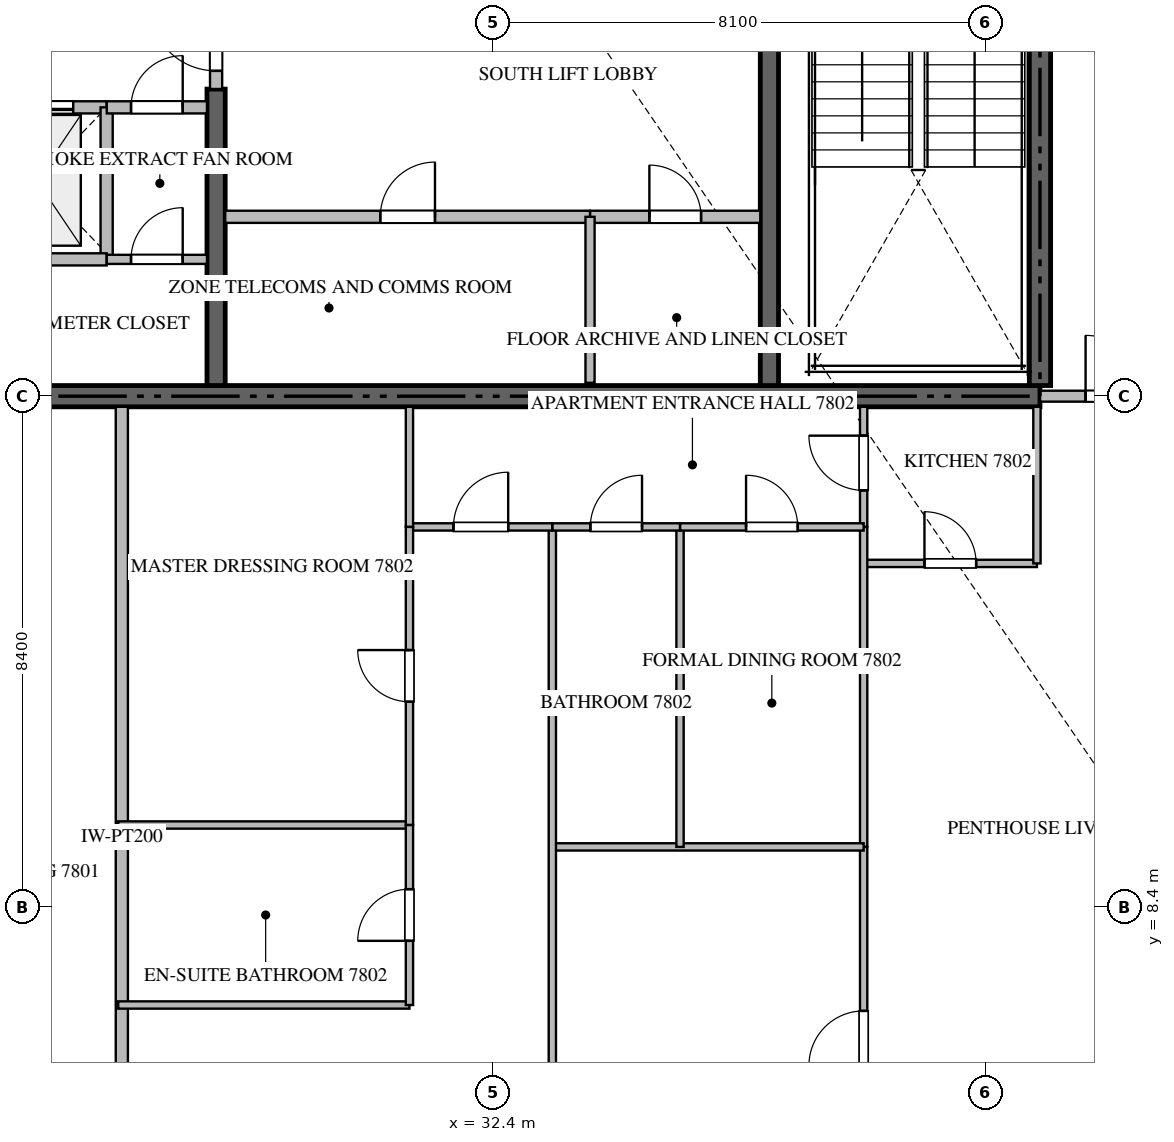
"""IFC4 building model, lengths in metres.
Left out: names, types, materials, properties, quantities, classifications, styles, units other than length and angle.
Written with IfcOpenShell. Run it as: python <this file> out.ifc"""

import sys

from ifc_helpers import new_model, si_unit, direction, frame, frame_2d, origin, place, context, subcontext, project, spatial, rectangle, extrude, source, transform, mapped, element, fill, save


model = new_model("IFC4")
c1 = context("Model", 3, precision=1e-05, world=origin(), true_north=direction((0.0, 1.0)))
c2 = subcontext(c1, "Body", "Model", "MODEL_VIEW")
j1 = project(units=[si_unit("LENGTHUNIT", "METRE"), si_unit("PLANEANGLEUNIT", "RADIAN")], contexts=[c1])
p1 = place(None, origin())
s1 = spatial("IfcSite", under=j1, at=p1, CompositionType="ELEMENT")
p2 = place(p1, origin())
s2 = spatial("IfcBuilding", under=s1, at=p2, CompositionType="ELEMENT")
p3 = place(p2, frame((0.0, 0.0, 313.7)))
s3 = spatial("IfcBuildingStorey", under=s2, at=p3, CompositionType="ELEMENT", Elevation=313.7)
p4 = place(p3, frame((23.4, 16.8, -0.26), z_axis=(0.0, 0.0, 1.0), x_axis=(1.0, 0.0, 0.0)))
e1 = element("IfcWall", 1, at=p4, inside=s3, PredefinedType="SHEAR", context=c2, shape_type="SweptSolid", body=[
    extrude(rectangle(XDim=18.0, YDim=0.35, at=frame_2d((9.0, 0.0))), origin(), (0.0, 0.0, 1.0), 4.048),
])
p5 = place(p3, frame((41.4, 16.975, -0.26), z_axis=(0.0, 0.0, 1.0), x_axis=(0.0, 1.0, 0.0)))
e2 = element("IfcWall", 2, at=p5, inside=s3, PredefinedType="SHEAR", context=c2, shape_type="SweptSolid", body=[
    extrude(rectangle(XDim=8.375, YDim=0.35, at=frame_2d((4.188, 0.0))), origin(), (0.0, 0.0, 1.0), 4.048),
])
p6 = place(p3, frame((27.85, 16.975, -0.26), z_axis=(0.0, 0.0, 1.0), x_axis=(0.0, 1.0, 0.0)))
e3 = element("IfcWall", 3, at=p6, inside=s3, PredefinedType="SHEAR", context=c2, shape_type="SweptSolid", body=[
    extrude(rectangle(XDim=4.875, YDim=0.3, at=frame_2d((2.438, 0.0))), origin(), (0.0, 0.0, 1.0), 4.048),
])
p7 = place(p3, frame((36.95, 16.975, -0.26), z_axis=(0.0, 0.0, 1.0), x_axis=(0.0, 1.0, 0.0)))
e4 = element("IfcWall", 4, at=p7, inside=s3, PredefinedType="SHEAR", context=c2, shape_type="SweptSolid", body=[
    extrude(rectangle(XDim=8.375, YDim=0.3, at=frame_2d((4.188, 0.0))), origin(), (0.0, 0.0, 1.0), 4.048),
])
p8 = place(p3, frame((23.575, 21.55, 0.0), z_axis=(0.0, 0.0, 1.0), x_axis=(1.0, 0.0, 0.0)))
e5 = element("IfcWall", 5, at=p8, inside=s3, PredefinedType="STANDARD", context=c2, shape_type="SweptSolid", body=[
    extrude(rectangle(XDim=2.475, YDim=0.2, at=frame_2d((1.238, 0.0))), origin(), (0.0, 0.0, 1.0), 3.79),
])
p9 = place(p8, frame((0.725, 0.0, 0.0)))
e6 = element("IfcOpeningElement", 6, at=p9, cuts=e5, PredefinedType="OPENING", context=c2, shape_type="SweptSolid", body=[
    extrude(rectangle(XDim=1.2, YDim=2.2, at=frame_2d((0.6, 1.1))), frame((0.0, 0.11, 0.0), z_axis=(0.0, -1.0, 0.0), x_axis=(1.0, 0.0, 0.0)), (0.0, 0.0, 1.0), 0.22),
])
p10 = place(p3, frame((26.05, 19.05, 0.0), z_axis=(0.0, 0.0, 1.0), x_axis=(0.0, 1.0, 0.0)))
e7 = element("IfcWall", 7, at=p10, inside=s3, PredefinedType="STANDARD", context=c2, shape_type="SweptSolid", body=[
    extrude(rectangle(XDim=2.5, YDim=0.2, at=frame_2d((1.25, 0.0))), origin(), (0.0, 0.0, 1.0), 3.79),
])
p11 = place(p3, frame((23.575, 19.05, 0.0), z_axis=(0.0, 0.0, 1.0), x_axis=(1.0, 0.0, 0.0)))
e8 = element("IfcWall", 8, at=p11, inside=s3, PredefinedType="STANDARD", context=c2, shape_type="SweptSolid", body=[
    extrude(rectangle(XDim=2.475, YDim=0.2, at=frame_2d((1.238, 0.0))), origin(), (0.0, 0.0, 1.0), 3.79),
])
p12 = place(p3, frame((26.052, 21.55, 0.0), z_axis=(0.0, 0.0, 1.0), x_axis=(1.0, 0.0, 0.0)))
e9 = element("IfcWall", 9, at=p12, inside=s3, PredefinedType="STANDARD", context=c2, shape_type="SweptSolid", body=[
    extrude(rectangle(XDim=1.648, YDim=0.2, at=frame_2d((0.824, 0.0))), origin(), (0.0, 0.0, 1.0), 3.79),
])
p13 = place(p12, frame((0.399, 0.0, 0.0)))
e10 = element("IfcOpeningElement", 10, at=p13, cuts=e9, PredefinedType="OPENING", context=c2, shape_type="SweptSolid", body=[
    extrude(rectangle(XDim=0.85, YDim=2.1, at=frame_2d((0.425, 1.05))), frame((0.0, 0.11, 0.0), z_axis=(0.0, -1.0, 0.0), x_axis=(1.0, 0.0, 0.0)), (0.0, 0.0, 1.0), 0.22),
])
p14 = place(p3, frame((27.85, 21.852, 0.0), z_axis=(0.0, 0.0, 1.0), x_axis=(0.0, 1.0, 0.0)))
e11 = element("IfcWall", 11, at=p14, inside=s3, PredefinedType="STANDARD", context=c2, shape_type="SweptSolid", body=[
    extrude(rectangle(XDim=1.696, YDim=0.2, at=frame_2d((0.848, 0.0))), origin(), (0.0, 0.0, 1.0), 3.79),
])
p15 = place(p14, frame((0.298, 0.0, 0.0)))
e12 = element("IfcOpeningElement", 12, at=p15, cuts=e11, PredefinedType="OPENING", context=c2, shape_type="SweptSolid", body=[
    extrude(rectangle(XDim=1.1, YDim=2.15, at=frame_2d((0.55, 1.075))), frame((0.0, 0.11, 0.0), z_axis=(0.0, -1.0, 0.0), x_axis=(1.0, 0.0, 0.0)), (0.0, 0.0, 1.0), 0.22),
])
p16 = place(p3, frame((26.052, 19.05, 0.0), z_axis=(0.0, 0.0, 1.0), x_axis=(1.0, 0.0, 0.0)))
e13 = element("IfcWall", 13, at=p16, inside=s3, PredefinedType="PARTITIONING", context=c2, shape_type="SweptSolid", body=[
    extrude(rectangle(XDim=1.648, YDim=0.15, at=frame_2d((0.824, 0.0))), origin(), (0.0, 0.0, 1.0), 3.79),
])
p17 = place(p16, frame((0.399, 0.0, 0.0)))
e14 = element("IfcOpeningElement", 14, at=p17, cuts=e13, PredefinedType="OPENING", context=c2, shape_type="SweptSolid", body=[
    extrude(rectangle(XDim=0.85, YDim=2.1, at=frame_2d((0.425, 1.05))), frame((0.0, 0.085, 0.0), z_axis=(0.0, -1.0, 0.0), x_axis=(1.0, 0.0, 0.0)), (0.0, 0.0, 1.0), 0.17),
])
p18 = place(p3, frame((28.0, 19.75, 0.0), z_axis=(0.0, 0.0, 1.0), x_axis=(1.0, 0.0, 0.0)))
e15 = element("IfcWall", 15, at=p18, inside=s3, PredefinedType="STANDARD", context=c2, shape_type="SweptSolid", body=[
    extrude(rectangle(XDim=6.0, YDim=0.2, at=frame_2d((3.0, 0.0))), origin(), (0.0, 0.0, 1.0), 3.79),
])
p19 = place(p18, frame((2.55, 0.0, 0.0)))
e16 = element("IfcOpeningElement", 16, at=p19, cuts=e15, PredefinedType="OPENING", context=c2, shape_type="SweptSolid", body=[
    extrude(rectangle(XDim=0.9, YDim=2.1, at=frame_2d((0.45, 1.05))), frame((0.0, 0.11, 0.0), z_axis=(0.0, -1.0, 0.0), x_axis=(1.0, 0.0, 0.0)), (0.0, 0.0, 1.0), 0.22),
])
p20 = place(p3, frame((34.002, 19.75, 0.0), z_axis=(0.0, 0.0, 1.0), x_axis=(1.0, 0.0, 0.0)))
e17 = element("IfcWall", 17, at=p20, inside=s3, PredefinedType="STANDARD", context=c2, shape_type="SweptSolid", body=[
    extrude(rectangle(XDim=2.798, YDim=0.2, at=frame_2d((1.399, 0.0))), origin(), (0.0, 0.0, 1.0), 3.79),
])
p21 = place(p20, frame((0.974, 0.0, 0.0)))
e18 = element("IfcOpeningElement", 18, at=p21, cuts=e17, PredefinedType="OPENING", context=c2, shape_type="SweptSolid", body=[
    extrude(rectangle(XDim=0.85, YDim=2.1, at=frame_2d((0.425, 1.05))), frame((0.0, 0.11, 0.0), z_axis=(0.0, -1.0, 0.0), x_axis=(1.0, 0.0, 0.0)), (0.0, 0.0, 1.0), 0.22),
])
p22 = place(p3, frame((34.0, 17.02, 0.0), z_axis=(0.0, 0.0, 1.0), x_axis=(0.0, 1.0, 0.0)))
e19 = element("IfcWall", 19, at=p22, inside=s3, PredefinedType="PARTITIONING", context=c2, shape_type="SweptSolid", body=[
    extrude(rectangle(XDim=2.73, YDim=0.15, at=frame_2d((1.365, 0.0))), origin(), (0.0, 0.0, 1.0), 3.79),
])
p23 = place(p3, frame((26.3, 2.482, 0.0), z_axis=(0.0, 0.0, 1.0), x_axis=(0.0, 1.0, 0.0)))
e20 = element("IfcWall", 20, at=p23, inside=s3, PredefinedType="PARTITIONING", context=c2, shape_type="SweptSolid", body=[
    extrude(rectangle(XDim=14.143, YDim=0.2, at=frame_2d((7.072, 0.0))), origin(), (0.0, 0.0, 1.0), 3.79),
])
p24 = place(p3, frame((41.402, 16.8, 0.0), z_axis=(0.0, 0.0, 1.0), x_axis=(1.0, 0.0, 0.0)))
e21 = element("IfcWall", 21, at=p24, inside=s3, PredefinedType="PARTITIONING", context=c2, shape_type="SweptSolid", body=[
    extrude(rectangle(XDim=2.496, YDim=0.18, at=frame_2d((1.248, 0.0))), origin(), (0.0, 0.0, 1.0), 3.79),
])
p25 = place(p24, frame((0.748, 0.0, 0.0)))
e22 = element("IfcOpeningElement", 22, at=p25, cuts=e21, PredefinedType="OPENING", context=c2, shape_type="SweptSolid", body=[
    extrude(rectangle(XDim=1.0, YDim=2.15, at=frame_2d((0.5, 1.075))), frame((0.0, 0.1, 0.0), z_axis=(0.0, -1.0, 0.0), x_axis=(1.0, 0.0, 0.0)), (0.0, 0.0, 1.0), 0.2),
])
p26 = place(p3, frame((38.5, 14.05, 0.0), z_axis=(0.0, 0.0, 1.0), x_axis=(1.0, 0.0, 0.0)))
e23 = element("IfcWall", 23, at=p26, inside=s3, PredefinedType="PARTITIONING", context=c2, shape_type="SweptSolid", body=[
    extrude(rectangle(XDim=2.85, YDim=0.12, at=frame_2d((1.425, 0.0))), origin(), (0.0, 0.0, 1.0), 3.79),
])
p27 = place(p26, frame((1.0, 0.0, 0.0)))
e24 = element("IfcOpeningElement", 24, at=p27, cuts=e23, PredefinedType="OPENING", context=c2, shape_type="SweptSolid", body=[
    extrude(rectangle(XDim=0.85, YDim=2.1, at=frame_2d((0.425, 1.05))), frame((0.0, 0.07, 0.0), z_axis=(0.0, -1.0, 0.0), x_axis=(1.0, 0.0, 0.0)), (0.0, 0.0, 1.0), 0.14),
])
p28 = place(p3, frame((41.35, 14.05, 0.0), z_axis=(0.0, 0.0, 1.0), x_axis=(0.0, 1.0, 0.0)))
e25 = element("IfcWall", 25, at=p28, inside=s3, PredefinedType="PARTITIONING", context=c2, shape_type="SweptSolid", body=[
    extrude(rectangle(XDim=2.575, YDim=0.12, at=frame_2d((1.288, 0.0))), origin(), (0.0, 0.0, 1.0), 3.79),
])
p29 = place(p3, frame((38.5, 14.65, 0.0), z_axis=(0.0, 0.0, 1.0), x_axis=(0.0, 1.0, 0.0)))
e26 = element("IfcWall", 26, at=p29, inside=s3, PredefinedType="PARTITIONING", context=c2, shape_type="SweptSolid", body=[
    extrude(rectangle(XDim=1.975, YDim=0.12, at=frame_2d((0.988, 0.0))), origin(), (0.0, 0.0, 1.0), 3.79),
])
p30 = place(p29, frame((0.601, 0.0, 0.0)))
e27 = element("IfcOpeningElement", 27, at=p30, cuts=e26, PredefinedType="OPENING", context=c2, shape_type="SweptSolid", body=[
    extrude(rectangle(XDim=0.9, YDim=2.1, at=frame_2d((0.45, 1.05))), frame((0.0, 0.07, 0.0), z_axis=(0.0, -1.0, 0.0), x_axis=(1.0, 0.0, 0.0)), (0.0, 0.0, 1.0), 0.14),
])
p31 = place(p3, frame((38.5, 2.495, 0.0), z_axis=(0.0, 0.0, 1.0), x_axis=(0.0, 1.0, 0.0)))
e28 = element("IfcWall", 28, at=p31, inside=s3, PredefinedType="PARTITIONING", context=c2, shape_type="SweptSolid", body=[
    extrude(rectangle(XDim=6.893, YDim=0.12, at=frame_2d((3.446, 0.0))), origin(), (0.0, 0.0, 1.0), 3.79),
])
p32 = place(p31, frame((3.296, 0.0, 0.0)))
e29 = element("IfcOpeningElement", 29, at=p32, cuts=e28, PredefinedType="OPENING", context=c2, shape_type="SweptSolid", body=[
    extrude(rectangle(XDim=0.9, YDim=2.1, at=frame_2d((0.45, 1.05))), frame((0.0, 0.07, 0.0), z_axis=(0.0, -1.0, 0.0), x_axis=(1.0, 0.0, 0.0)), (0.0, 0.0, 1.0), 0.14),
])
p33 = place(p3, frame((38.5, 9.39, 0.0), z_axis=(0.0, 0.0, 1.0), x_axis=(0.0, 1.0, 0.0)))
e30 = element("IfcWall", 30, at=p33, inside=s3, PredefinedType="PARTITIONING", context=c2, shape_type="SweptSolid", body=[
    extrude(rectangle(XDim=5.258, YDim=0.12, at=frame_2d((2.629, 0.0))), origin(), (0.0, 0.0, 1.0), 3.79),
])
p34 = place(p3, frame((33.38, 9.388, 0.0), z_axis=(0.0, 0.0, 1.0), x_axis=(1.0, 0.0, 0.0)))
e31 = element("IfcWall", 31, at=p34, inside=s3, PredefinedType="PARTITIONING", context=c2, shape_type="SweptSolid", body=[
    extrude(rectangle(XDim=5.12, YDim=0.12, at=frame_2d((2.56, 0.0))), origin(), (0.0, 0.0, 1.0), 3.79),
])
p35 = place(p3, frame((33.38, 2.495, 0.0), z_axis=(0.0, 0.0, 1.0), x_axis=(0.0, 1.0, 0.0)))
e32 = element("IfcWall", 32, at=p35, inside=s3, PredefinedType="PARTITIONING", context=c2, shape_type="SweptSolid", body=[
    extrude(rectangle(XDim=12.155, YDim=0.12, at=frame_2d((6.077, 0.0))), origin(), (0.0, 0.0, 1.0), 3.79),
])
p36 = place(p3, frame((35.48, 9.388, 0.0), z_axis=(0.0, 0.0, 1.0), x_axis=(0.0, 1.0, 0.0)))
e33 = element("IfcWall", 33, at=p36, inside=s3, PredefinedType="PARTITIONING", context=c2, shape_type="SweptSolid", body=[
    extrude(rectangle(XDim=5.262, YDim=0.12, at=frame_2d((2.631, 0.0))), origin(), (0.0, 0.0, 1.0), 3.79),
])
p37 = place(p3, frame((33.38, 14.65, 0.0), z_axis=(0.0, 0.0, 1.0), x_axis=(1.0, 0.0, 0.0)))
e34 = element("IfcWall", 34, at=p37, inside=s3, PredefinedType="PARTITIONING", context=c2, shape_type="SweptSolid", body=[
    extrude(rectangle(XDim=2.1, YDim=0.12, at=frame_2d((1.05, 0.0))), origin(), (0.0, 0.0, 1.0), 3.79),
])
p38 = place(p37, frame((0.625, 0.0, 0.0)))
e35 = element("IfcOpeningElement", 35, at=p38, cuts=e34, PredefinedType="OPENING", context=c2, shape_type="SweptSolid", body=[
    extrude(rectangle(XDim=0.85, YDim=2.1, at=frame_2d((0.425, 1.05))), frame((0.0, 0.07, 0.0), z_axis=(0.0, -1.0, 0.0), x_axis=(1.0, 0.0, 0.0)), (0.0, 0.0, 1.0), 0.14),
])
p39 = place(p3, frame((35.482, 14.65, 0.0), z_axis=(0.0, 0.0, 1.0), x_axis=(1.0, 0.0, 0.0)))
e36 = element("IfcWall", 36, at=p39, inside=s3, PredefinedType="PARTITIONING", context=c2, shape_type="SweptSolid", body=[
    extrude(rectangle(XDim=3.018, YDim=0.12, at=frame_2d((1.509, 0.0))), origin(), (0.0, 0.0, 1.0), 3.79),
])
p40 = place(p39, frame((1.084, 0.0, 0.0)))
e37 = element("IfcOpeningElement", 37, at=p40, cuts=e36, PredefinedType="OPENING", context=c2, shape_type="SweptSolid", body=[
    extrude(rectangle(XDim=0.85, YDim=2.1, at=frame_2d((0.425, 1.05))), frame((0.0, 0.07, 0.0), z_axis=(0.0, -1.0, 0.0), x_axis=(1.0, 0.0, 0.0)), (0.0, 0.0, 1.0), 0.14),
])
p41 = place(p3, frame((31.03, 14.65, 0.0), z_axis=(0.0, 0.0, 1.0), x_axis=(1.0, 0.0, 0.0)))
e38 = element("IfcWall", 38, at=p41, inside=s3, PredefinedType="PARTITIONING", context=c2, shape_type="SweptSolid", body=[
    extrude(rectangle(XDim=2.348, YDim=0.12, at=frame_2d((1.174, 0.0))), origin(), (0.0, 0.0, 1.0), 3.79),
])
p42 = place(p41, frame((0.724, 0.0, 0.0)))
e39 = element("IfcOpeningElement", 39, at=p42, cuts=e38, PredefinedType="OPENING", context=c2, shape_type="SweptSolid", body=[
    extrude(rectangle(XDim=0.9, YDim=2.1, at=frame_2d((0.45, 1.05))), frame((0.0, 0.07, 0.0), z_axis=(0.0, -1.0, 0.0), x_axis=(1.0, 0.0, 0.0)), (0.0, 0.0, 1.0), 0.14),
])
for number, where, z_axis, x_axis in (
    (40, (26.24, 6.788, 0.0), (0.0, 0.0, 1.0), (1.0, 0.0, 0.0)),
    (41, (26.24, 9.748, 0.0), (0.0, 0.0, 1.0), (1.0, 0.0, 0.0)),
):
    element("IfcWall", number, at=place(p3, frame(where, z_axis=z_axis, x_axis=x_axis)), inside=s3, PredefinedType="PARTITIONING", context=c2, shape_type="SweptSolid", body=[
        extrude(rectangle(XDim=4.79, YDim=0.12, at=frame_2d((2.395, 0.0))), origin(), (0.0, 0.0, 1.0), 3.79),
    ])
p43 = place(p3, frame((31.03, 6.788, 0.0), z_axis=(0.0, 0.0, 1.0), x_axis=(0.0, 1.0, 0.0)))
e42 = element("IfcWall", 42, at=p43, inside=s3, PredefinedType="PARTITIONING", context=c2, shape_type="SweptSolid", body=[
    extrude(rectangle(XDim=2.96, YDim=0.12, at=frame_2d((1.48, 0.0))), origin(), (0.0, 0.0, 1.0), 3.79),
])
p44 = place(p43, frame((1.055, 0.0, 0.0)))
e43 = element("IfcOpeningElement", 43, at=p44, cuts=e42, PredefinedType="OPENING", context=c2, shape_type="SweptSolid", body=[
    extrude(rectangle(XDim=0.85, YDim=2.1, at=frame_2d((0.425, 1.05))), frame((0.0, 0.07, 0.0), z_axis=(0.0, -1.0, 0.0), x_axis=(1.0, 0.0, 0.0)), (0.0, 0.0, 1.0), 0.14),
])
p45 = place(p3, frame((31.03, 9.75, 0.0), z_axis=(0.0, 0.0, 1.0), x_axis=(0.0, 1.0, 0.0)))
e44 = element("IfcWall", 44, at=p45, inside=s3, PredefinedType="PARTITIONING", context=c2, shape_type="SweptSolid", body=[
    extrude(rectangle(XDim=4.9, YDim=0.12, at=frame_2d((2.45, 0.0))), origin(), (0.0, 0.0, 1.0), 3.79),
])
p46 = place(p45, frame((2.025, 0.0, 0.0)))
e45 = element("IfcOpeningElement", 45, at=p46, cuts=e44, PredefinedType="OPENING", context=c2, shape_type="SweptSolid", body=[
    extrude(rectangle(XDim=0.85, YDim=2.1, at=frame_2d((0.425, 1.05))), frame((0.0, 0.07, 0.0), z_axis=(0.0, -1.0, 0.0), x_axis=(1.0, 0.0, 0.0)), (0.0, 0.0, 1.0), 0.14),
])
p47 = place(p3, frame((31.03, 14.652, 0.0), z_axis=(0.0, 0.0, 1.0), x_axis=(0.0, 1.0, 0.0)))
e46 = element("IfcWall", 46, at=p47, inside=s3, PredefinedType="PARTITIONING", context=c2, shape_type="SweptSolid", body=[
    extrude(rectangle(XDim=1.973, YDim=0.12, at=frame_2d((0.986, 0.0))), origin(), (0.0, 0.0, 1.0), 3.79),
])
m1 = source(origin(), c2, "Body", "SweptSolid", [
    extrude(rectangle(XDim=1.2, YDim=2.2, at=frame_2d((0.6, 1.1))), frame((0.0, 0.025, 0.0), z_axis=(0.0, -1.0, 0.0), x_axis=(1.0, 0.0, 0.0)), (0.0, 0.0, 1.0), 0.05),
])
p48 = place(p9, origin())
e47 = element("IfcDoor", 47, at=p48, inside=s3, OperationType="DOUBLE_DOOR_SLIDING", PredefinedType="DOOR", context=c2, shape_type="MappedRepresentation", body=[
    mapped(m1, transform((0.0, 0.0, 0.0), scale=1.0)),
])
fill(e6, e47)
m2 = source(origin(), c2, "Body", "SweptSolid", [
    extrude(rectangle(XDim=0.85, YDim=2.1, at=frame_2d((0.425, 1.05))), frame((0.0, 0.025, 0.0), z_axis=(0.0, -1.0, 0.0), x_axis=(1.0, 0.0, 0.0)), (0.0, 0.0, 1.0), 0.05),
])
p49 = place(p13, origin())
e48 = element("IfcDoor", 48, at=p49, inside=s3, OperationType="SINGLE_SWING_RIGHT", PredefinedType="DOOR", context=c2, shape_type="MappedRepresentation", body=[
    mapped(m2, transform((0.0, 0.0, 0.0), scale=1.0)),
])
fill(e10, e48)
m3 = source(origin(), c2, "Body", "SweptSolid", [
    extrude(rectangle(XDim=1.1, YDim=2.15, at=frame_2d((0.55, 1.075))), frame((0.0, 0.025, 0.0), z_axis=(0.0, -1.0, 0.0), x_axis=(1.0, 0.0, 0.0)), (0.0, 0.0, 1.0), 0.05),
])
p50 = place(p15, origin())
e49 = element("IfcDoor", 49, at=p50, inside=s3, OperationType="SINGLE_SWING_RIGHT", PredefinedType="DOOR", context=c2, shape_type="MappedRepresentation", body=[
    mapped(m3, transform((0.0, 0.0, 0.0), scale=1.0)),
])
fill(e12, e49)
p51 = place(p17, origin())
e50 = element("IfcDoor", 50, at=p51, inside=s3, OperationType="SINGLE_SWING_RIGHT", PredefinedType="DOOR", context=c2, shape_type="MappedRepresentation", body=[
    mapped(m2, transform((0.0, 0.0, 0.0), scale=1.0)),
])
fill(e14, e50)
m4 = source(origin(), c2, "Body", "SweptSolid", [
    extrude(rectangle(XDim=0.9, YDim=2.1, at=frame_2d((0.45, 1.05))), frame((0.0, 0.025, 0.0), z_axis=(0.0, -1.0, 0.0), x_axis=(1.0, 0.0, 0.0)), (0.0, 0.0, 1.0), 0.05),
])
p52 = place(p19, origin())
e51 = element("IfcDoor", 51, at=p52, inside=s3, OperationType="SINGLE_SWING_RIGHT", PredefinedType="DOOR", context=c2, shape_type="MappedRepresentation", body=[
    mapped(m4, transform((0.0, 0.0, 0.0), scale=1.0)),
])
fill(e16, e51)
p53 = place(p21, origin())
e52 = element("IfcDoor", 52, at=p53, inside=s3, OperationType="SINGLE_SWING_LEFT", PredefinedType="DOOR", context=c2, shape_type="MappedRepresentation", body=[
    mapped(m2, transform((0.0, 0.0, 0.0), scale=1.0)),
])
fill(e18, e52)
m5 = source(origin(), c2, "Body", "SweptSolid", [
    extrude(rectangle(XDim=1.0, YDim=2.15, at=frame_2d((0.5, 1.075))), frame((0.0, 0.025, 0.0), z_axis=(0.0, -1.0, 0.0), x_axis=(1.0, 0.0, 0.0)), (0.0, 0.0, 1.0), 0.05),
])
p54 = place(p25, origin())
e53 = element("IfcDoor", 53, at=p54, inside=s3, OperationType="SINGLE_SWING_LEFT", PredefinedType="DOOR", context=c2, shape_type="MappedRepresentation", body=[
    mapped(m5, transform((0.0, 0.0, 0.0), scale=1.0)),
])
fill(e22, e53)
p55 = place(p27, origin())
e54 = element("IfcDoor", 54, at=p55, inside=s3, OperationType="SINGLE_SWING_LEFT", PredefinedType="DOOR", context=c2, shape_type="MappedRepresentation", body=[
    mapped(m2, transform((0.0, 0.0, 0.0), scale=1.0)),
])
fill(e24, e54)
p56 = place(p30, origin())
e55 = element("IfcDoor", 55, at=p56, inside=s3, OperationType="SINGLE_SWING_RIGHT", PredefinedType="DOOR", context=c2, shape_type="MappedRepresentation", body=[
    mapped(m4, transform((0.0, 0.0, 0.0), scale=1.0)),
])
fill(e27, e55)
p57 = place(p32, origin())
e56 = element("IfcDoor", 56, at=p57, inside=s3, OperationType="SINGLE_SWING_LEFT", PredefinedType="DOOR", context=c2, shape_type="MappedRepresentation", body=[
    mapped(m4, transform((0.0, 0.0, 0.0), scale=1.0)),
])
fill(e29, e56)
p58 = place(p38, origin())
e57 = element("IfcDoor", 57, at=p58, inside=s3, OperationType="SINGLE_SWING_RIGHT", PredefinedType="DOOR", context=c2, shape_type="MappedRepresentation", body=[
    mapped(m2, transform((0.0, 0.0, 0.0), scale=1.0)),
])
fill(e35, e57)
p59 = place(p40, origin())
e58 = element("IfcDoor", 58, at=p59, inside=s3, OperationType="SINGLE_SWING_LEFT", PredefinedType="DOOR", context=c2, shape_type="MappedRepresentation", body=[
    mapped(m2, transform((0.0, 0.0, 0.0), scale=1.0)),
])
fill(e37, e58)
p60 = place(p42, origin())
e59 = element("IfcDoor", 59, at=p60, inside=s3, OperationType="SINGLE_SWING_RIGHT", PredefinedType="DOOR", context=c2, shape_type="MappedRepresentation", body=[
    mapped(m4, transform((0.0, 0.0, 0.0), scale=1.0)),
])
fill(e39, e59)
p61 = place(p44, origin())
e60 = element("IfcDoor", 60, at=p61, inside=s3, OperationType="SINGLE_SWING_LEFT", PredefinedType="DOOR", context=c2, shape_type="MappedRepresentation", body=[
    mapped(m2, transform((0.0, 0.0, 0.0), scale=1.0)),
])
fill(e43, e60)
p62 = place(p46, origin())
e61 = element("IfcDoor", 61, at=p62, inside=s3, OperationType="SINGLE_SWING_RIGHT", PredefinedType="DOOR", context=c2, shape_type="MappedRepresentation", body=[
    mapped(m2, transform((0.0, 0.0, 0.0), scale=1.0)),
])
fill(e45, e61)
save(model, sys.argv[1])
